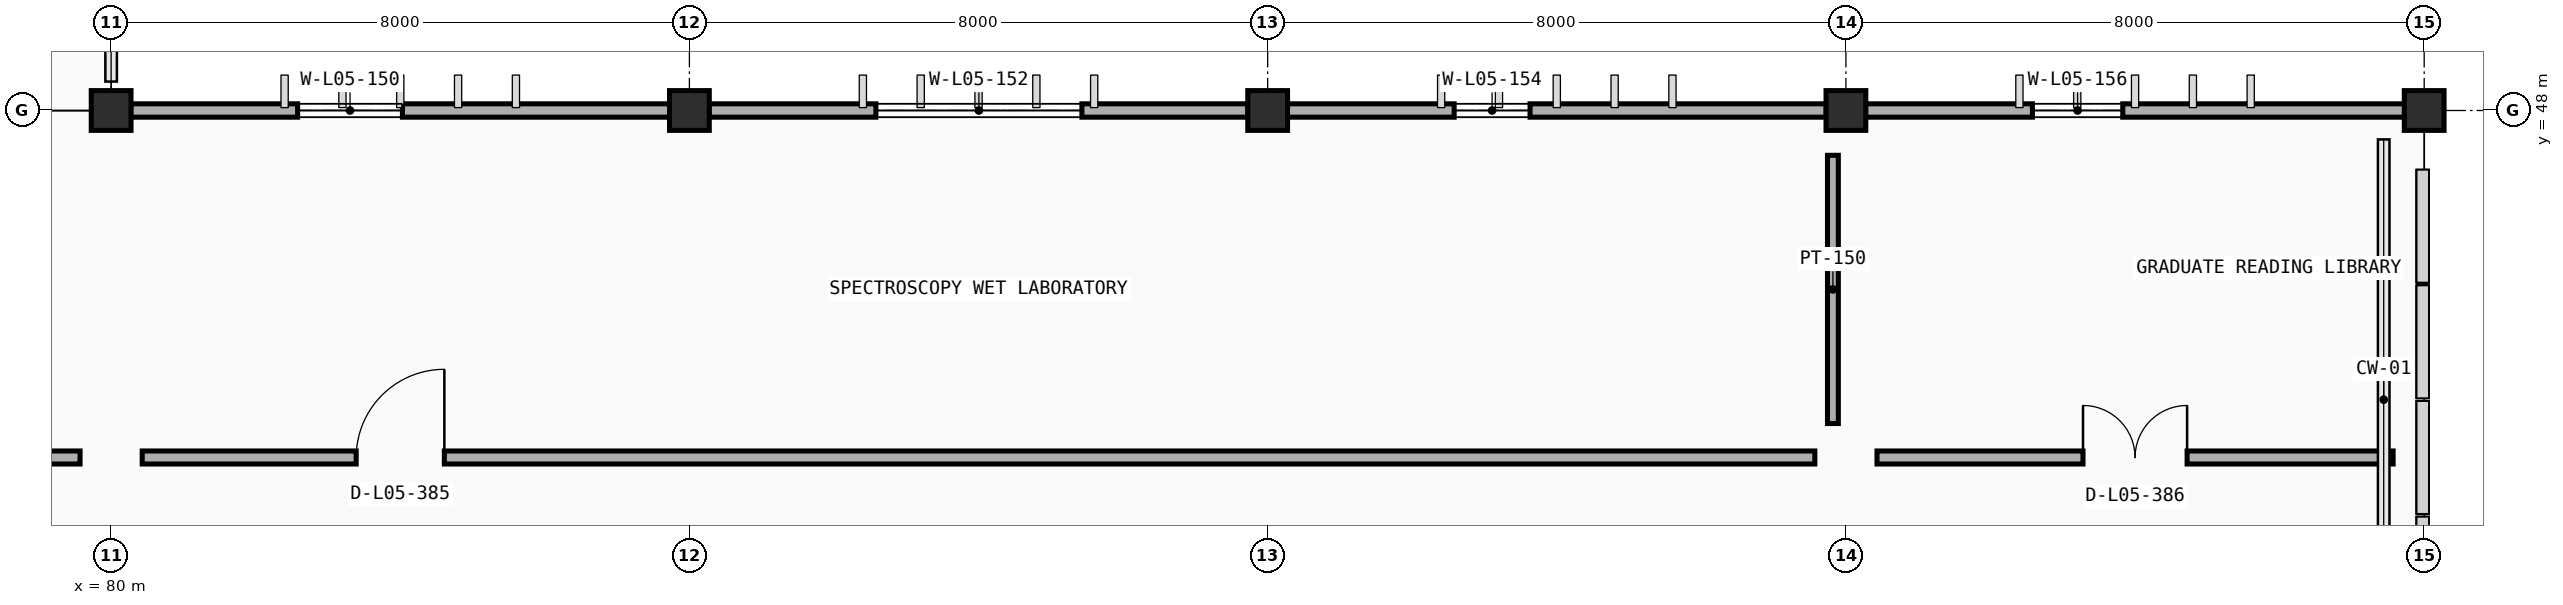
"""IFC4 building model, lengths in metres.
Left out: names, types, materials, properties, quantities, classifications, styles, units other than length and angle.
Written with IfcOpenShell. Run it as: python <this file> out.ifc"""

import sys

from ifc_helpers import new_model, si_unit, direction, frame, frame_2d, origin, origin_2d, place, context, subcontext, project, spatial, rectangle, extrude, element, fill, save


model = new_model("IFC4")
c1 = context("Model", 3, precision=1e-05, world=origin(), true_north=direction((0.0, 1.0)))
c2 = subcontext(c1, "Body", "Model", "MODEL_VIEW")
j1 = project(units=[si_unit("LENGTHUNIT", "METRE"), si_unit("PLANEANGLEUNIT", "RADIAN")], contexts=[c1])
p1 = place(None, origin())
s1 = spatial("IfcSite", under=j1, at=p1, CompositionType="ELEMENT")
p2 = place(p1, origin())
s2 = spatial("IfcBuilding", under=s1, at=p2, CompositionType="ELEMENT")
p3 = place(p2, frame((0.0, 0.0, 18.0)))
s3 = spatial("IfcBuildingStorey", under=s2, at=p3, CompositionType="ELEMENT", Elevation=18.0)
for number, where, z_axis, x_axis in (
    (1, (80.0, 48.0, 0.0), (0.0, 0.0, 1.0), (1.0, 0.0, 0.0)),
    (2, (88.0, 48.0, 0.0), (0.0, 0.0, 1.0), (1.0, 0.0, 0.0)),
    (3, (96.0, 48.0, 0.0), (0.0, 0.0, 1.0), (1.0, 0.0, 0.0)),
    (4, (104.0, 48.0, 0.0), (0.0, 0.0, 1.0), (1.0, 0.0, 0.0)),
    (5, (112.0, 48.0, 0.0), (0.0, 0.0, 1.0), (1.0, 0.0, 0.0)),
):
    element("IfcColumn", number, at=place(p3, frame(where, z_axis=z_axis, x_axis=x_axis)), inside=s3, PredefinedType="COLUMN", context=c2, shape_type="SweptSolid", body=[
        extrude(rectangle(XDim=0.55, YDim=0.55, at=origin_2d()), origin(), (0.0, 0.0, 1.0), 4.2),
    ])
p4 = place(p3, frame((80.272, 48.0, 0.0), z_axis=(0.0, 0.0, 1.0), x_axis=(1.0, 0.0, 0.0)))
e6 = element("IfcWall", 6, at=p4, inside=s3, PredefinedType="STANDARD", context=c2, shape_type="SweptSolid", body=[
    extrude(rectangle(XDim=7.456, YDim=0.185, at=frame_2d((3.728, 0.0))), origin(), (0.0, 0.0, 1.0), 3.335),
])
p5 = place(p4, frame((2.308, 0.0, 0.9)))
e7 = element("IfcOpeningElement", 7, at=p5, cuts=e6, PredefinedType="OPENING", context=c2, shape_type="SweptSolid", body=[
    extrude(rectangle(XDim=1.45, YDim=1.7, at=frame_2d((0.725, 0.85))), frame((0.0, 0.103, 0.0), z_axis=(0.0, -1.0, 0.0), x_axis=(1.0, 0.0, 0.0)), (0.0, 0.0, 1.0), 0.205),
])
p6 = place(p3, frame((88.272, 48.0, 0.0), z_axis=(0.0, 0.0, 1.0), x_axis=(1.0, 0.0, 0.0)))
e8 = element("IfcWall", 8, at=p6, inside=s3, PredefinedType="STANDARD", context=c2, shape_type="SweptSolid", body=[
    extrude(rectangle(XDim=7.456, YDim=0.185, at=frame_2d((3.728, 0.0))), origin(), (0.0, 0.0, 1.0), 3.335),
])
p7 = place(p6, frame((2.308, 0.0, 0.9)))
e9 = element("IfcOpeningElement", 9, at=p7, cuts=e8, PredefinedType="OPENING", context=c2, shape_type="SweptSolid", body=[
    extrude(rectangle(XDim=2.85, YDim=1.55, at=frame_2d((1.425, 0.775))), frame((0.0, 0.103, 0.0), z_axis=(0.0, -1.0, 0.0), x_axis=(1.0, 0.0, 0.0)), (0.0, 0.0, 1.0), 0.205),
])
p8 = place(p3, frame((96.272, 48.0, 0.0), z_axis=(0.0, 0.0, 1.0), x_axis=(1.0, 0.0, 0.0)))
e10 = element("IfcWall", 10, at=p8, inside=s3, PredefinedType="STANDARD", context=c2, shape_type="SweptSolid", body=[
    extrude(rectangle(XDim=7.456, YDim=0.185, at=frame_2d((3.728, 0.0))), origin(), (0.0, 0.0, 1.0), 3.335),
])
p9 = place(p8, frame((2.308, 0.0, 0.9)))
e11 = element("IfcOpeningElement", 11, at=p9, cuts=e10, PredefinedType="OPENING", context=c2, shape_type="SweptSolid", body=[
    extrude(rectangle(XDim=1.05, YDim=1.7, at=frame_2d((0.525, 0.85))), frame((0.0, 0.103, 0.0), z_axis=(0.0, -1.0, 0.0), x_axis=(1.0, 0.0, 0.0)), (0.0, 0.0, 1.0), 0.205),
])
p10 = place(p3, frame((104.272, 48.0, 0.0), z_axis=(0.0, 0.0, 1.0), x_axis=(1.0, 0.0, 0.0)))
e12 = element("IfcWall", 12, at=p10, inside=s3, PredefinedType="STANDARD", context=c2, shape_type="SweptSolid", body=[
    extrude(rectangle(XDim=7.456, YDim=0.185, at=frame_2d((3.728, 0.0))), origin(), (0.0, 0.0, 1.0), 3.335),
])
p11 = place(p10, frame((2.308, 0.0, 0.9)))
e13 = element("IfcOpeningElement", 13, at=p11, cuts=e12, PredefinedType="OPENING", context=c2, shape_type="SweptSolid", body=[
    extrude(rectangle(XDim=1.25, YDim=1.7, at=frame_2d((0.625, 0.85))), frame((0.0, 0.103, 0.0), z_axis=(0.0, -1.0, 0.0), x_axis=(1.0, 0.0, 0.0)), (0.0, 0.0, 1.0), 0.205),
])
p12 = place(p3, frame((111.76, 47.78, 0.0), z_axis=(0.0, 0.0, 1.0), x_axis=(-1.0, 0.0, 0.0)))
e14 = element("IfcWall", 14, at=p12, inside=s3, PredefinedType="PARAPET", context=c2, shape_type="SweptSolid", body=[
    extrude(rectangle(XDim=0.32, YDim=0.2, at=frame_2d((0.16, 0.0))), origin(), (0.0, 0.0, 1.0), 3.35),
])
p13 = place(p3, frame((56.43, 43.2, 0.0), z_axis=(0.0, 0.0, 1.0), x_axis=(1.0, 0.0, 0.0)))
e15 = element("IfcWall", 15, at=p13, inside=s3, PredefinedType="PARTITIONING", context=c2, shape_type="SweptSolid", body=[
    extrude(rectangle(XDim=23.14, YDim=0.18, at=frame_2d((11.57, 0.0))), origin(), (0.0, 0.0, 1.0), 3.3),
])
p14 = place(p13, frame((2.73, 0.0, 0.0)))
e16 = element("IfcOpeningElement", 16, at=p14, cuts=e15, PredefinedType="OPENING", context=c2, shape_type="SweptSolid", body=[
    extrude(rectangle(XDim=1.68, YDim=2.25, at=frame_2d((0.84, 1.125))), frame((0.0, 0.1, 0.0), z_axis=(0.0, -1.0, 0.0), x_axis=(1.0, 0.0, 0.0)), (0.0, 0.0, 1.0), 0.2),
])
p15 = place(p3, frame((80.43, 43.2, 0.0), z_axis=(0.0, 0.0, 1.0), x_axis=(1.0, 0.0, 0.0)))
e17 = element("IfcWall", 17, at=p15, inside=s3, PredefinedType="PARTITIONING", context=c2, shape_type="SweptSolid", body=[
    extrude(rectangle(XDim=23.14, YDim=0.18, at=frame_2d((11.57, 0.0))), origin(), (0.0, 0.0, 1.0), 3.3),
])
p16 = place(p15, frame((2.96, 0.0, 0.0)))
e18 = element("IfcOpeningElement", 18, at=p16, cuts=e17, PredefinedType="OPENING", context=c2, shape_type="SweptSolid", body=[
    extrude(rectangle(XDim=1.22, YDim=2.18, at=frame_2d((0.61, 1.09))), frame((0.0, 0.1, 0.0), z_axis=(0.0, -1.0, 0.0), x_axis=(1.0, 0.0, 0.0)), (0.0, 0.0, 1.0), 0.2),
])
p17 = place(p3, frame((103.82, 43.67, 0.0), z_axis=(0.0, 0.0, 1.0), x_axis=(0.0, 1.0, 0.0)))
e19 = element("IfcWall", 19, at=p17, inside=s3, PredefinedType="PARTITIONING", context=c2, shape_type="SweptSolid", body=[
    extrude(rectangle(XDim=3.71, YDim=0.15, at=frame_2d((1.855, 0.0))), origin(), (0.0, 0.0, 1.0), 3.3),
])
p18 = place(p3, frame((104.43, 43.2, 0.0), z_axis=(0.0, 0.0, 1.0), x_axis=(1.0, 0.0, 0.0)))
e20 = element("IfcWall", 20, at=p18, inside=s3, PredefinedType="PARTITIONING", context=c2, shape_type="SweptSolid", body=[
    extrude(rectangle(XDim=7.14, YDim=0.18, at=frame_2d((3.57, 0.0))), origin(), (0.0, 0.0, 1.0), 3.3),
])
p19 = place(p18, frame((2.85, 0.0, 0.0)))
e21 = element("IfcOpeningElement", 21, at=p19, cuts=e20, PredefinedType="OPENING", context=c2, shape_type="SweptSolid", body=[
    extrude(rectangle(XDim=1.44, YDim=2.2, at=frame_2d((0.72, 1.1))), frame((0.0, 0.1, 0.0), z_axis=(0.0, -1.0, 0.0), x_axis=(1.0, 0.0, 0.0)), (0.0, 0.0, 1.0), 0.2),
])
p20 = place(p5, origin())
e22 = element("IfcWindow", 22, at=p20, inside=s3, PartitioningType="SINGLE_PANEL", PredefinedType="WINDOW", context=c2, shape_type="SweptSolid", body=[
    extrude(rectangle(XDim=1.45, YDim=1.7, at=frame_2d((0.725, 0.85))), frame((0.0, 0.03, 0.0), z_axis=(0.0, -1.0, 0.0), x_axis=(1.0, 0.0, 0.0)), (0.0, 0.0, 1.0), 0.06),
])
fill(e7, e22)
p21 = place(p7, origin())
e23 = element("IfcWindow", 23, at=p21, inside=s3, PartitioningType="DOUBLE_PANEL_VERTICAL", PredefinedType="WINDOW", context=c2, shape_type="SweptSolid", body=[
    extrude(rectangle(XDim=2.85, YDim=1.55, at=frame_2d((1.425, 0.775))), frame((0.0, 0.03, 0.0), z_axis=(0.0, -1.0, 0.0), x_axis=(1.0, 0.0, 0.0)), (0.0, 0.0, 1.0), 0.06),
])
fill(e9, e23)
p22 = place(p9, origin())
e24 = element("IfcWindow", 24, at=p22, inside=s3, PartitioningType="SINGLE_PANEL", PredefinedType="WINDOW", context=c2, shape_type="SweptSolid", body=[
    extrude(rectangle(XDim=1.05, YDim=1.7, at=frame_2d((0.525, 0.85))), frame((0.0, 0.03, 0.0), z_axis=(0.0, -1.0, 0.0), x_axis=(1.0, 0.0, 0.0)), (0.0, 0.0, 1.0), 0.06),
])
fill(e11, e24)
p23 = place(p11, origin())
e25 = element("IfcWindow", 25, at=p23, inside=s3, PartitioningType="SINGLE_PANEL", PredefinedType="WINDOW", context=c2, shape_type="SweptSolid", body=[
    extrude(rectangle(XDim=1.25, YDim=1.7, at=frame_2d((0.625, 0.85))), frame((0.0, 0.03, 0.0), z_axis=(0.0, -1.0, 0.0), x_axis=(1.0, 0.0, 0.0)), (0.0, 0.0, 1.0), 0.06),
])
fill(e13, e25)
p24 = place(p16, origin())
e26 = element("IfcDoor", 26, at=p24, inside=s3, OperationType="SINGLE_SWING_RIGHT", PredefinedType="DOOR", context=c2, shape_type="SweptSolid", body=[
    extrude(rectangle(XDim=1.22, YDim=2.18, at=frame_2d((0.61, 1.09))), frame((0.0, 0.025, 0.0), z_axis=(0.0, -1.0, 0.0), x_axis=(1.0, 0.0, 0.0)), (0.0, 0.0, 1.0), 0.05),
])
fill(e18, e26)
p25 = place(p19, origin())
e27 = element("IfcDoor", 27, at=p25, inside=s3, OperationType="DOUBLE_DOOR_SINGLE_SWING", PredefinedType="DOOR", context=c2, shape_type="SweptSolid", body=[
    extrude(rectangle(XDim=1.44, YDim=2.2, at=frame_2d((0.72, 1.1))), frame((0.0, 0.025, 0.0), z_axis=(0.0, -1.0, 0.0), x_axis=(1.0, 0.0, 0.0)), (0.0, 0.0, 1.0), 0.05),
])
fill(e21, e27)
save(model, sys.argv[1])
